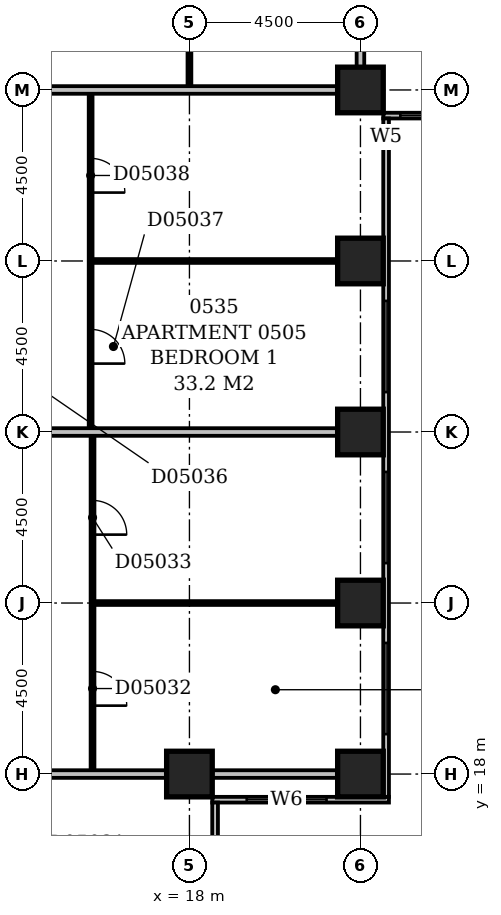
"""IFC4 building model, lengths in metres.
Left out: names, types, materials, properties, quantities, classifications, styles, units other than length and angle.
Written with IfcOpenShell. Run it as: python <this file> out.ifc"""

import sys

from ifc_helpers import new_model, si_unit, direction, frame, frame_2d, origin, origin_2d, place, context, subcontext, project, spatial, rectangle, extrude, element, fill, save


model = new_model("IFC4")
c1 = context("Model", 3, precision=1e-05, world=origin(), true_north=direction((0.0, 1.0)))
c2 = subcontext(c1, "Body", "Model", "MODEL_VIEW")
j1 = project(units=[si_unit("LENGTHUNIT", "METRE"), si_unit("PLANEANGLEUNIT", "RADIAN")], contexts=[c1])
p1 = place(None, origin())
s1 = spatial("IfcSite", under=j1, at=p1, CompositionType="ELEMENT")
p2 = place(p1, origin())
s2 = spatial("IfcBuilding", under=s1, at=p2, CompositionType="ELEMENT")
p3 = place(p2, frame((0.0, 0.0, 29.0)))
s3 = spatial("IfcBuildingStorey", under=s2, at=p3, CompositionType="ELEMENT", Elevation=29.0)
for number, where, z_axis, x_axis in (
    (1, (18.0, 18.0, -0.3), (0.0, 0.0, 1.0), (1.0, 0.0, 0.0)),
    (2, (22.5, 18.0, -0.3), (0.0, 0.0, 1.0), (1.0, 0.0, 0.0)),
    (3, (22.5, 22.5, -0.3), (0.0, 0.0, 1.0), (1.0, 0.0, 0.0)),
    (4, (22.5, 27.0, -0.3), (0.0, 0.0, 1.0), (1.0, 0.0, 0.0)),
    (5, (22.5, 31.5, -0.3), (0.0, 0.0, 1.0), (1.0, 0.0, 0.0)),
    (6, (22.5, 36.0, -0.3), (0.0, 0.0, 1.0), (1.0, 0.0, 0.0)),
):
    element("IfcColumn", number, at=place(p3, frame(where, z_axis=z_axis, x_axis=x_axis)), inside=s3, PredefinedType="COLUMN", context=c2, shape_type="SweptSolid", body=[
        extrude(rectangle(XDim=1.2, YDim=1.2, at=origin_2d()), origin(), (0.0, 0.0, 1.0), 3.6),
    ])
p4 = place(p3, frame((18.675, 8.4, 0.0), z_axis=(0.0, 0.0, 1.0), x_axis=(0.0, 1.0, 0.0)))
e7 = element("IfcWall", 7, at=p4, inside=s3, PredefinedType="STANDARD", context=c2, shape_type="SweptSolid", body=[
    extrude(rectangle(XDim=8.85, YDim=0.15, at=frame_2d((4.425, 0.0))), origin(), (0.0, 0.0, 1.0), 2.7),
])
p5 = place(p4, frame((1.65, 0.0, 0.6)))
e8 = element("IfcOpeningElement", 8, at=p5, cuts=e7, PredefinedType="OPENING", context=c2, shape_type="SweptSolid", body=[
    extrude(rectangle(XDim=2.4, YDim=1.8, at=frame_2d((1.2, 0.9))), frame((0.0, 0.087, 0.0), z_axis=(0.0, -1.0, 0.0), x_axis=(1.0, 0.0, 0.0)), (0.0, 0.0, 1.0), 0.174),
])
p6 = place(p4, frame((6.04, 0.0, 0.6)))
e9 = element("IfcOpeningElement", 9, at=p6, cuts=e7, PredefinedType="OPENING", context=c2, shape_type="SweptSolid", body=[
    extrude(rectangle(XDim=0.9, YDim=1.8, at=frame_2d((0.45, 0.9))), frame((0.0, 0.087, 0.0), z_axis=(0.0, -1.0, 0.0), x_axis=(1.0, 0.0, 0.0)), (0.0, 0.0, 1.0), 0.174),
])
p7 = place(p3, frame((18.6, 17.325, 0.0), z_axis=(0.0, 0.0, 1.0), x_axis=(1.0, 0.0, 0.0)))
e10 = element("IfcWall", 10, at=p7, inside=s3, PredefinedType="STANDARD", context=c2, shape_type="SweptSolid", body=[
    extrude(rectangle(XDim=4.65, YDim=0.15, at=frame_2d((2.325, 0.0))), origin(), (0.0, 0.0, 1.0), 2.7),
])
p8 = place(p7, frame((0.907, 0.0, 0.6)))
e11 = element("IfcOpeningElement", 11, at=p8, cuts=e10, PredefinedType="OPENING", context=c2, shape_type="SweptSolid", body=[
    extrude(rectangle(XDim=2.1, YDim=1.8, at=frame_2d((1.05, 0.9))), frame((0.0, 0.087, 0.0), z_axis=(0.0, -1.0, 0.0), x_axis=(1.0, 0.0, 0.0)), (0.0, 0.0, 1.0), 0.174),
])
p9 = place(p3, frame((23.175, 17.4, 0.0), z_axis=(0.0, 0.0, 1.0), x_axis=(0.0, 1.0, 0.0)))
e12 = element("IfcWall", 12, at=p9, inside=s3, PredefinedType="STANDARD", context=c2, shape_type="SweptSolid", body=[
    extrude(rectangle(XDim=17.85, YDim=0.15, at=frame_2d((8.925, 0.0))), origin(), (0.0, 0.0, 1.0), 2.7),
])
p10 = place(p9, frame((1.65, 0.0, 0.6)))
e13 = element("IfcOpeningElement", 13, at=p10, cuts=e12, PredefinedType="OPENING", context=c2, shape_type="SweptSolid", body=[
    extrude(rectangle(XDim=2.4, YDim=1.8, at=frame_2d((1.2, 0.9))), frame((0.0, 0.087, 0.0), z_axis=(0.0, -1.0, 0.0), x_axis=(1.0, 0.0, 0.0)), (0.0, 0.0, 1.0), 0.174),
])
p11 = place(p9, frame((6.15, 0.0, 0.6)))
e14 = element("IfcOpeningElement", 14, at=p11, cuts=e12, PredefinedType="OPENING", context=c2, shape_type="SweptSolid", body=[
    extrude(rectangle(XDim=2.4, YDim=1.8, at=frame_2d((1.2, 0.9))), frame((0.0, 0.087, 0.0), z_axis=(0.0, -1.0, 0.0), x_axis=(1.0, 0.0, 0.0)), (0.0, 0.0, 1.0), 0.174),
])
p12 = place(p9, frame((10.65, 0.0, 0.6)))
e15 = element("IfcOpeningElement", 15, at=p12, cuts=e12, PredefinedType="OPENING", context=c2, shape_type="SweptSolid", body=[
    extrude(rectangle(XDim=2.4, YDim=1.8, at=frame_2d((1.2, 0.9))), frame((0.0, 0.087, 0.0), z_axis=(0.0, -1.0, 0.0), x_axis=(1.0, 0.0, 0.0)), (0.0, 0.0, 1.0), 0.174),
])
p13 = place(p9, frame((17.138, 0.0, 0.6)))
e16 = element("IfcOpeningElement", 16, at=p13, cuts=e12, PredefinedType="OPENING", context=c2, shape_type="SweptSolid", body=[
    extrude(rectangle(XDim=0.45, YDim=1.8, at=frame_2d((0.225, 0.9))), frame((0.0, 0.087, 0.0), z_axis=(0.0, -1.0, 0.0), x_axis=(1.0, 0.0, 0.0)), (0.0, 0.0, 1.0), 0.174),
])
p14 = place(p3, frame((23.1, 35.325, 0.0), z_axis=(0.0, 0.0, 1.0), x_axis=(1.0, 0.0, 0.0)))
e17 = element("IfcWall", 17, at=p14, inside=s3, PredefinedType="STANDARD", context=c2, shape_type="SweptSolid", body=[
    extrude(rectangle(XDim=45.15, YDim=0.15, at=frame_2d((22.575, 0.0))), origin(), (0.0, 0.0, 1.0), 2.7),
])
p15 = place(p14, frame((0.45, 0.0, 0.6)))
e18 = element("IfcOpeningElement", 18, at=p15, cuts=e17, PredefinedType="OPENING", context=c2, shape_type="SweptSolid", body=[
    extrude(rectangle(XDim=2.4, YDim=1.8, at=frame_2d((1.2, 0.9))), frame((0.0, 0.087, 0.0), z_axis=(0.0, -1.0, 0.0), x_axis=(1.0, 0.0, 0.0)), (0.0, 0.0, 1.0), 0.174),
])
p16 = place(p14, frame((4.95, 0.0, 0.6)))
e19 = element("IfcOpeningElement", 19, at=p16, cuts=e17, PredefinedType="OPENING", context=c2, shape_type="SweptSolid", body=[
    extrude(rectangle(XDim=2.4, YDim=1.8, at=frame_2d((1.2, 0.9))), frame((0.0, 0.087, 0.0), z_axis=(0.0, -1.0, 0.0), x_axis=(1.0, 0.0, 0.0)), (0.0, 0.0, 1.0), 0.174),
])
p17 = place(p14, frame((9.25, 0.0, 0.6)))
e20 = element("IfcOpeningElement", 20, at=p17, cuts=e17, PredefinedType="OPENING", context=c2, shape_type="SweptSolid", body=[
    extrude(rectangle(XDim=1.5, YDim=1.8, at=frame_2d((0.75, 0.9))), frame((0.0, 0.087, 0.0), z_axis=(0.0, -1.0, 0.0), x_axis=(1.0, 0.0, 0.0)), (0.0, 0.0, 1.0), 0.174),
])
p18 = place(p14, frame((15.277, 0.0, 0.6)))
e21 = element("IfcOpeningElement", 21, at=p18, cuts=e17, PredefinedType="OPENING", context=c2, shape_type="SweptSolid", body=[
    extrude(rectangle(XDim=1.2, YDim=1.8, at=frame_2d((0.6, 0.9))), frame((0.0, 0.087, 0.0), z_axis=(0.0, -1.0, 0.0), x_axis=(1.0, 0.0, 0.0)), (0.0, 0.0, 1.0), 0.174),
])
p19 = place(p14, frame((18.45, 0.0, 0.6)))
e22 = element("IfcOpeningElement", 22, at=p19, cuts=e17, PredefinedType="OPENING", context=c2, shape_type="SweptSolid", body=[
    extrude(rectangle(XDim=2.4, YDim=1.8, at=frame_2d((1.2, 0.9))), frame((0.0, 0.087, 0.0), z_axis=(0.0, -1.0, 0.0), x_axis=(1.0, 0.0, 0.0)), (0.0, 0.0, 1.0), 0.174),
])
p20 = place(p14, frame((22.95, 0.0, 0.6)))
e23 = element("IfcOpeningElement", 23, at=p20, cuts=e17, PredefinedType="OPENING", context=c2, shape_type="SweptSolid", body=[
    extrude(rectangle(XDim=2.4, YDim=1.8, at=frame_2d((1.2, 0.9))), frame((0.0, 0.087, 0.0), z_axis=(0.0, -1.0, 0.0), x_axis=(1.0, 0.0, 0.0)), (0.0, 0.0, 1.0), 0.174),
])
p21 = place(p14, frame((27.45, 0.0, 0.6)))
e24 = element("IfcOpeningElement", 24, at=p21, cuts=e17, PredefinedType="OPENING", context=c2, shape_type="SweptSolid", body=[
    extrude(rectangle(XDim=2.4, YDim=1.8, at=frame_2d((1.2, 0.9))), frame((0.0, 0.087, 0.0), z_axis=(0.0, -1.0, 0.0), x_axis=(1.0, 0.0, 0.0)), (0.0, 0.0, 1.0), 0.174),
])
p22 = place(p14, frame((31.95, 0.0, 0.6)))
e25 = element("IfcOpeningElement", 25, at=p22, cuts=e17, PredefinedType="OPENING", context=c2, shape_type="SweptSolid", body=[
    extrude(rectangle(XDim=2.4, YDim=1.8, at=frame_2d((1.2, 0.9))), frame((0.0, 0.087, 0.0), z_axis=(0.0, -1.0, 0.0), x_axis=(1.0, 0.0, 0.0)), (0.0, 0.0, 1.0), 0.174),
])
p23 = place(p14, frame((36.45, 0.0, 0.6)))
e26 = element("IfcOpeningElement", 26, at=p23, cuts=e17, PredefinedType="OPENING", context=c2, shape_type="SweptSolid", body=[
    extrude(rectangle(XDim=2.4, YDim=1.8, at=frame_2d((1.2, 0.9))), frame((0.0, 0.087, 0.0), z_axis=(0.0, -1.0, 0.0), x_axis=(1.0, 0.0, 0.0)), (0.0, 0.0, 1.0), 0.174),
])
p24 = place(p14, frame((40.797, 0.0, 0.6)))
e27 = element("IfcOpeningElement", 27, at=p24, cuts=e17, PredefinedType="OPENING", context=c2, shape_type="SweptSolid", body=[
    extrude(rectangle(XDim=0.6, YDim=1.8, at=frame_2d((0.3, 0.9))), frame((0.0, 0.087, 0.0), z_axis=(0.0, -1.0, 0.0), x_axis=(1.0, 0.0, 0.0)), (0.0, 0.0, 1.0), 0.174),
])
p25 = place(p3, frame((9.1, 18.0, 0.0), z_axis=(0.0, 0.0, 1.0), x_axis=(1.0, 0.0, 0.0)))
e28 = element("IfcWall", 28, at=p25, inside=s3, PredefinedType="PARTITIONING", context=c2, shape_type="SweptSolid", body=[
    extrude(rectangle(XDim=8.3, YDim=0.2, at=frame_2d((4.15, 0.0))), origin(), (0.0, 0.0, 1.0), 2.6),
])
p26 = place(p3, frame((18.6, 18.0, 0.0), z_axis=(0.0, 0.0, 1.0), x_axis=(1.0, 0.0, 0.0)))
e29 = element("IfcWall", 29, at=p26, inside=s3, PredefinedType="PARTITIONING", context=c2, shape_type="SweptSolid", body=[
    extrude(rectangle(XDim=3.3, YDim=0.2, at=frame_2d((1.65, 0.0))), origin(), (0.0, 0.0, 1.0), 2.7),
])
p27 = place(p3, frame((15.45, 18.1, 0.0), z_axis=(0.0, 0.0, 1.0), x_axis=(0.0, 1.0, 0.0)))
e30 = element("IfcWall", 30, at=p27, inside=s3, PredefinedType="PARTITIONING", context=c2, shape_type="SweptSolid", body=[
    extrude(rectangle(XDim=8.8, YDim=0.1, at=frame_2d((4.4, 0.0))), origin(), (0.0, 0.0, 1.0), 3.3),
])
p28 = place(p27, frame((1.7, 0.0, 0.0)))
e31 = element("IfcOpeningElement", 31, at=p28, cuts=e30, PredefinedType="OPENING", context=c2, shape_type="SweptSolid", body=[
    extrude(rectangle(XDim=0.9, YDim=2.1, at=frame_2d((0.45, 1.05))), frame((0.0, 0.062, 0.0), z_axis=(0.0, -1.0, 0.0), x_axis=(1.0, 0.0, 0.0)), (0.0, 0.0, 1.0), 0.124),
])
p29 = place(p27, frame((6.2, 0.0, 0.0)))
e32 = element("IfcOpeningElement", 32, at=p29, cuts=e30, PredefinedType="OPENING", context=c2, shape_type="SweptSolid", body=[
    extrude(rectangle(XDim=0.9, YDim=2.1, at=frame_2d((0.45, 1.05))), frame((0.0, 0.062, 0.0), z_axis=(0.0, -1.0, 0.0), x_axis=(1.0, 0.0, 0.0)), (0.0, 0.0, 1.0), 0.124),
])
p30 = place(p3, frame((15.5, 22.5, 0.0), z_axis=(0.0, 0.0, 1.0), x_axis=(1.0, 0.0, 0.0)))
e33 = element("IfcWall", 33, at=p30, inside=s3, PredefinedType="PARTITIONING", context=c2, shape_type="SweptSolid", body=[
    extrude(rectangle(XDim=6.4, YDim=0.1, at=frame_2d((3.2, 0.0))), origin(), (0.0, 0.0, 1.0), 3.3),
])
p31 = place(p3, frame((9.1, 27.0, 0.0), z_axis=(0.0, 0.0, 1.0), x_axis=(1.0, 0.0, 0.0)))
e34 = element("IfcWall", 34, at=p31, inside=s3, PredefinedType="PARTITIONING", context=c2, shape_type="SweptSolid", body=[
    extrude(rectangle(XDim=12.8, YDim=0.2, at=frame_2d((6.4, 0.0))), origin(), (0.0, 0.0, 1.0), 2.7),
])
p32 = place(p3, frame((15.4, 27.1, 0.0), z_axis=(0.0, 0.0, 1.0), x_axis=(0.0, 1.0, 0.0)))
e35 = element("IfcWall", 35, at=p32, inside=s3, PredefinedType="PARTITIONING", context=c2, shape_type="SweptSolid", body=[
    extrude(rectangle(XDim=8.8, YDim=0.1, at=frame_2d((4.4, 0.0))), origin(), (0.0, 0.0, 1.0), 3.3),
])
p33 = place(p32, frame((1.7, 0.0, 0.0)))
e36 = element("IfcOpeningElement", 36, at=p33, cuts=e35, PredefinedType="OPENING", context=c2, shape_type="SweptSolid", body=[
    extrude(rectangle(XDim=0.9, YDim=2.1, at=frame_2d((0.45, 1.05))), frame((0.0, 0.062, 0.0), z_axis=(0.0, -1.0, 0.0), x_axis=(1.0, 0.0, 0.0)), (0.0, 0.0, 1.0), 0.124),
])
p34 = place(p32, frame((6.2, 0.0, 0.0)))
e37 = element("IfcOpeningElement", 37, at=p34, cuts=e35, PredefinedType="OPENING", context=c2, shape_type="SweptSolid", body=[
    extrude(rectangle(XDim=0.9, YDim=2.1, at=frame_2d((0.45, 1.05))), frame((0.0, 0.062, 0.0), z_axis=(0.0, -1.0, 0.0), x_axis=(1.0, 0.0, 0.0)), (0.0, 0.0, 1.0), 0.124),
])
p35 = place(p3, frame((15.45, 31.5, 0.0), z_axis=(0.0, 0.0, 1.0), x_axis=(1.0, 0.0, 0.0)))
e38 = element("IfcWall", 38, at=p35, inside=s3, PredefinedType="PARTITIONING", context=c2, shape_type="SweptSolid", body=[
    extrude(rectangle(XDim=6.45, YDim=0.1, at=frame_2d((3.225, 0.0))), origin(), (0.0, 0.0, 1.0), 3.3),
])
p36 = place(p3, frame((9.1, 36.0, 0.0), z_axis=(0.0, 0.0, 1.0), x_axis=(1.0, 0.0, 0.0)))
e39 = element("IfcWall", 39, at=p36, inside=s3, PredefinedType="PARTITIONING", context=c2, shape_type="SweptSolid", body=[
    extrude(rectangle(XDim=12.8, YDim=0.2, at=frame_2d((6.4, 0.0))), origin(), (0.0, 0.0, 1.0), 2.4),
])
p37 = place(p3, frame((18.0, 36.1, 0.0), z_axis=(0.0, 0.0, 1.0), x_axis=(0.0, 1.0, 0.0)))
e40 = element("IfcWall", 40, at=p37, inside=s3, PredefinedType="PARTITIONING", context=c2, shape_type="SweptSolid", body=[
    extrude(rectangle(XDim=13.3, YDim=0.1, at=frame_2d((6.65, 0.0))), origin(), (0.0, 0.0, 1.0), 3.3),
])
p38 = place(p3, frame((22.5, 36.6, 0.0), z_axis=(0.0, 0.0, 1.0), x_axis=(0.0, 1.0, 0.0)))
e41 = element("IfcWall", 41, at=p38, inside=s3, PredefinedType="PARTITIONING", context=c2, shape_type="SweptSolid", body=[
    extrude(rectangle(XDim=12.8, YDim=0.2, at=frame_2d((6.4, 0.0))), origin(), (0.0, 0.0, 1.0), 3.3),
])
p39 = place(p8, origin())
e42 = element("IfcWindow", 42, at=p39, inside=s3, PartitioningType="SINGLE_PANEL", PredefinedType="WINDOW", context=c2, shape_type="SweptSolid", body=[
    extrude(rectangle(XDim=2.1, YDim=1.8, at=frame_2d((1.05, 0.9))), frame((0.0, 0.03, 0.0), z_axis=(0.0, -1.0, 0.0), x_axis=(1.0, 0.0, 0.0)), (0.0, 0.0, 1.0), 0.06),
])
fill(e11, e42)
p40 = place(p10, origin())
e43 = element("IfcWindow", 43, at=p40, inside=s3, PartitioningType="SINGLE_PANEL", PredefinedType="WINDOW", context=c2, shape_type="SweptSolid", body=[
    extrude(rectangle(XDim=2.4, YDim=1.8, at=frame_2d((1.2, 0.9))), frame((0.0, 0.03, 0.0), z_axis=(0.0, -1.0, 0.0), x_axis=(1.0, 0.0, 0.0)), (0.0, 0.0, 1.0), 0.06),
])
fill(e13, e43)
p41 = place(p11, origin())
e44 = element("IfcWindow", 44, at=p41, inside=s3, PartitioningType="SINGLE_PANEL", PredefinedType="WINDOW", context=c2, shape_type="SweptSolid", body=[
    extrude(rectangle(XDim=2.4, YDim=1.8, at=frame_2d((1.2, 0.9))), frame((0.0, 0.03, 0.0), z_axis=(0.0, -1.0, 0.0), x_axis=(1.0, 0.0, 0.0)), (0.0, 0.0, 1.0), 0.06),
])
fill(e14, e44)
p42 = place(p12, origin())
e45 = element("IfcWindow", 45, at=p42, inside=s3, PartitioningType="SINGLE_PANEL", PredefinedType="WINDOW", context=c2, shape_type="SweptSolid", body=[
    extrude(rectangle(XDim=2.4, YDim=1.8, at=frame_2d((1.2, 0.9))), frame((0.0, 0.03, 0.0), z_axis=(0.0, -1.0, 0.0), x_axis=(1.0, 0.0, 0.0)), (0.0, 0.0, 1.0), 0.06),
])
fill(e15, e45)
p43 = place(p13, origin())
e46 = element("IfcWindow", 46, at=p43, inside=s3, PartitioningType="SINGLE_PANEL", PredefinedType="WINDOW", context=c2, shape_type="SweptSolid", body=[
    extrude(rectangle(XDim=0.45, YDim=1.8, at=frame_2d((0.225, 0.9))), frame((0.0, 0.03, 0.0), z_axis=(0.0, -1.0, 0.0), x_axis=(1.0, 0.0, 0.0)), (0.0, 0.0, 1.0), 0.06),
])
fill(e16, e46)
p44 = place(p15, origin())
e47 = element("IfcWindow", 47, at=p44, inside=s3, PartitioningType="SINGLE_PANEL", PredefinedType="WINDOW", context=c2, shape_type="SweptSolid", body=[
    extrude(rectangle(XDim=2.4, YDim=1.8, at=frame_2d((1.2, 0.9))), frame((0.0, 0.03, 0.0), z_axis=(0.0, -1.0, 0.0), x_axis=(1.0, 0.0, 0.0)), (0.0, 0.0, 1.0), 0.06),
])
fill(e18, e47)
p45 = place(p28, frame((0.9, 0.0, 0.0), z_axis=(0.0, 0.0, 1.0), x_axis=(-1.0, 0.0, 0.0)))
e48 = element("IfcDoor", 48, at=p45, inside=s3, OperationType="SINGLE_SWING_RIGHT", PredefinedType="DOOR", context=c2, shape_type="SweptSolid", body=[
    extrude(rectangle(XDim=0.9, YDim=2.1, at=frame_2d((0.45, 1.05))), frame((0.0, 0.025, 0.0), z_axis=(0.0, -1.0, 0.0), x_axis=(1.0, 0.0, 0.0)), (0.0, 0.0, 1.0), 0.05),
])
fill(e31, e48)
p46 = place(p29, frame((0.9, 0.0, 0.0), z_axis=(0.0, 0.0, 1.0), x_axis=(-1.0, 0.0, 0.0)))
e49 = element("IfcDoor", 49, at=p46, inside=s3, OperationType="SINGLE_SWING_RIGHT", PredefinedType="DOOR", context=c2, shape_type="SweptSolid", body=[
    extrude(rectangle(XDim=0.9, YDim=2.1, at=frame_2d((0.45, 1.05))), frame((0.0, 0.025, 0.0), z_axis=(0.0, -1.0, 0.0), x_axis=(1.0, 0.0, 0.0)), (0.0, 0.0, 1.0), 0.05),
])
fill(e32, e49)
p47 = place(p33, frame((0.9, 0.0, 0.0), z_axis=(0.0, 0.0, 1.0), x_axis=(-1.0, 0.0, 0.0)))
e50 = element("IfcDoor", 50, at=p47, inside=s3, OperationType="SINGLE_SWING_RIGHT", PredefinedType="DOOR", context=c2, shape_type="SweptSolid", body=[
    extrude(rectangle(XDim=0.9, YDim=2.1, at=frame_2d((0.45, 1.05))), frame((0.0, 0.025, 0.0), z_axis=(0.0, -1.0, 0.0), x_axis=(1.0, 0.0, 0.0)), (0.0, 0.0, 1.0), 0.05),
])
fill(e36, e50)
p48 = place(p34, frame((0.9, 0.0, 0.0), z_axis=(0.0, 0.0, 1.0), x_axis=(-1.0, 0.0, 0.0)))
e51 = element("IfcDoor", 51, at=p48, inside=s3, OperationType="SINGLE_SWING_RIGHT", PredefinedType="DOOR", context=c2, shape_type="SweptSolid", body=[
    extrude(rectangle(XDim=0.9, YDim=2.1, at=frame_2d((0.45, 1.05))), frame((0.0, 0.025, 0.0), z_axis=(0.0, -1.0, 0.0), x_axis=(1.0, 0.0, 0.0)), (0.0, 0.0, 1.0), 0.05),
])
fill(e37, e51)
save(model, sys.argv[1])
